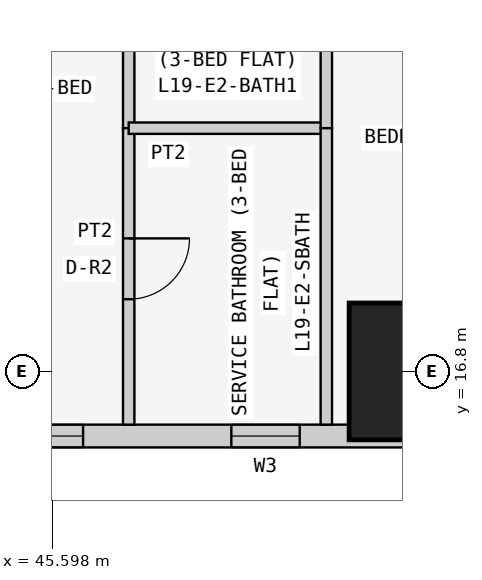
"""IFC4 building model, lengths in metres.
Left out: names, types, materials, properties, quantities, classifications, styles, units other than length and angle.
Written with IfcOpenShell. Run it as: python <this file> out.ifc"""

import sys

from ifc_helpers import new_model, si_unit, direction, frame, frame_2d, origin, origin_2d, place, context, subcontext, project, spatial, rectangle, extrude, element, fill, save


model = new_model("IFC4")
c1 = context("Model", 3, precision=1e-05, world=origin(), true_north=direction((0.0, 1.0)))
c2 = subcontext(c1, "Body", "Model", "MODEL_VIEW")
j1 = project(units=[si_unit("LENGTHUNIT", "METRE"), si_unit("PLANEANGLEUNIT", "RADIAN")], contexts=[c1])
p1 = place(None, origin())
s1 = spatial("IfcSite", under=j1, at=p1, CompositionType="ELEMENT")
p2 = place(p1, origin())
s2 = spatial("IfcBuilding", under=s1, at=p2, CompositionType="ELEMENT")
p3 = place(p2, frame((0.0, 0.0, 77.7)))
s3 = spatial("IfcBuildingStorey", under=s2, at=p3, CompositionType="ELEMENT", Elevation=77.7)
p4 = place(p3, frame((50.4, 16.8, 0.0), z_axis=(0.0, 0.0, 1.0), x_axis=(1.0, 0.0, 0.0)))
e1 = element("IfcColumn", 1, at=p4, inside=s3, PredefinedType="COLUMN", context=c2, shape_type="SweptSolid", body=[
    extrude(rectangle(XDim=1.8, YDim=1.8, at=origin_2d()), origin(), (0.0, 0.0, 1.0), 3.6),
])
p5 = place(p3, frame((43.0, 15.95, 0.0), z_axis=(0.0, 0.0, 1.0), x_axis=(1.0, 0.0, 0.0)))
e2 = element("IfcWall", 2, at=p5, inside=s3, PredefinedType="SOLIDWALL", context=c2, shape_type="SweptSolid", body=[
    extrude(rectangle(XDim=15.4, YDim=0.3, at=frame_2d((7.7, 0.0))), origin(), (0.0, 0.0, 1.0), 3.45),
])
p6 = place(p5, frame((1.2, 0.0, 0.9)))
e3 = element("IfcOpeningElement", 3, at=p6, cuts=e2, PredefinedType="OPENING", context=c2, shape_type="SweptSolid", body=[
    extrude(rectangle(XDim=1.8, YDim=1.5, at=frame_2d((0.9, 0.75))), frame((0.0, 0.16, 0.0), z_axis=(0.0, -1.0, 0.0), x_axis=(1.0, 0.0, 0.0)), (0.0, 0.0, 1.0), 0.32),
])
p7 = place(p5, frame((4.95, 0.0, 1.5)))
e4 = element("IfcOpeningElement", 4, at=p7, cuts=e2, PredefinedType="OPENING", context=c2, shape_type="SweptSolid", body=[
    extrude(rectangle(XDim=0.9, YDim=0.7, at=frame_2d((0.45, 0.35))), frame((0.0, 0.16, 0.0), z_axis=(0.0, -1.0, 0.0), x_axis=(1.0, 0.0, 0.0)), (0.0, 0.0, 1.0), 0.32),
])
p8 = place(p5, frame((8.5, 0.0, 0.9)))
e5 = element("IfcOpeningElement", 5, at=p8, cuts=e2, PredefinedType="OPENING", context=c2, shape_type="SweptSolid", body=[
    extrude(rectangle(XDim=1.8, YDim=1.5, at=frame_2d((0.9, 0.75))), frame((0.0, 0.16, 0.0), z_axis=(0.0, -1.0, 0.0), x_axis=(1.0, 0.0, 0.0)), (0.0, 0.0, 1.0), 0.32),
])
p9 = place(p5, frame((12.5, 0.0, 0.0)))
e6 = element("IfcOpeningElement", 6, at=p9, cuts=e2, PredefinedType="OPENING", context=c2, shape_type="SweptSolid", body=[
    extrude(rectangle(XDim=0.9, YDim=2.4, at=frame_2d((0.45, 1.2))), frame((0.0, 0.16, 0.0), z_axis=(0.0, -1.0, 0.0), x_axis=(1.0, 0.0, 0.0)), (0.0, 0.0, 1.0), 0.32),
])
p10 = place(p5, frame((13.5, 0.0, 0.9)))
e7 = element("IfcOpeningElement", 7, at=p10, cuts=e2, PredefinedType="OPENING", context=c2, shape_type="SweptSolid", body=[
    extrude(rectangle(XDim=1.2, YDim=1.5, at=frame_2d((0.6, 0.75))), frame((0.0, 0.16, 0.0), z_axis=(0.0, -1.0, 0.0), x_axis=(1.0, 0.0, 0.0)), (0.0, 0.0, 1.0), 0.32),
])
p11 = place(p3, frame((46.6, 22.971, 0.0), z_axis=(0.0, 0.0, 1.0), x_axis=(0.0, -1.0, 0.0)))
e8 = element("IfcWall", 8, at=p11, inside=s3, PredefinedType="PARTITIONING", context=c2, shape_type="SweptSolid", body=[
    extrude(rectangle(XDim=2.971, YDim=0.15, at=frame_2d((1.485, 0.0))), origin(), (0.0, 0.0, 1.0), 3.45),
])
p12 = place(p3, frame((46.6, 20.0, 0.0), z_axis=(0.0, 0.0, 1.0), x_axis=(0.0, -1.0, 0.0)))
e9 = element("IfcWall", 9, at=p12, inside=s3, PredefinedType="PARTITIONING", context=c2, shape_type="SweptSolid", body=[
    extrude(rectangle(XDim=3.9, YDim=0.15, at=frame_2d((1.95, 0.0))), origin(), (0.0, 0.0, 1.0), 3.45),
])
p13 = place(p12, frame((1.45, 0.0, 0.0)))
e10 = element("IfcOpeningElement", 10, at=p13, cuts=e9, PredefinedType="OPENING", context=c2, shape_type="SweptSolid", body=[
    extrude(rectangle(XDim=0.8, YDim=2.1, at=frame_2d((0.4, 1.05))), frame((0.0, 0.085, 0.0), z_axis=(0.0, -1.0, 0.0), x_axis=(1.0, 0.0, 0.0)), (0.0, 0.0, 1.0), 0.17),
])
p14 = place(p3, frame((49.2, 20.0, 0.0), z_axis=(0.0, 0.0, 1.0), x_axis=(-1.0, 0.0, 0.0)))
e11 = element("IfcWall", 11, at=p14, inside=s3, PredefinedType="PARTITIONING", context=c2, shape_type="SweptSolid", body=[
    extrude(rectangle(XDim=2.6, YDim=0.15, at=frame_2d((1.3, 0.0))), origin(), (0.0, 0.0, 1.0), 3.45),
])
p15 = place(p3, frame((49.2, 22.971, 0.0), z_axis=(0.0, 0.0, 1.0), x_axis=(0.0, -1.0, 0.0)))
e12 = element("IfcWall", 12, at=p15, inside=s3, PredefinedType="PARTITIONING", context=c2, shape_type="SweptSolid", body=[
    extrude(rectangle(XDim=2.971, YDim=0.15, at=frame_2d((1.485, 0.0))), origin(), (0.0, 0.0, 1.0), 3.45),
])
p16 = place(p3, frame((49.2, 20.0, 0.0), z_axis=(0.0, 0.0, 1.0), x_axis=(0.0, -1.0, 0.0)))
e13 = element("IfcWall", 13, at=p16, inside=s3, PredefinedType="PARTITIONING", context=c2, shape_type="SweptSolid", body=[
    extrude(rectangle(XDim=3.9, YDim=0.15, at=frame_2d((1.95, 0.0))), origin(), (0.0, 0.0, 1.0), 3.45),
])
p17 = place(p6, origin())
e14 = element("IfcWindow", 14, at=p17, inside=s3, PartitioningType="SINGLE_PANEL", PredefinedType="WINDOW", context=c2, shape_type="SweptSolid", body=[
    extrude(rectangle(XDim=1.8, YDim=1.5, at=frame_2d((0.9, 0.75))), frame((0.0, 0.03, 0.0), z_axis=(0.0, -1.0, 0.0), x_axis=(1.0, 0.0, 0.0)), (0.0, 0.0, 1.0), 0.06),
])
fill(e3, e14)
p18 = place(p7, origin())
e15 = element("IfcWindow", 15, at=p18, inside=s3, PartitioningType="SINGLE_PANEL", PredefinedType="WINDOW", context=c2, shape_type="SweptSolid", body=[
    extrude(rectangle(XDim=0.9, YDim=0.7, at=frame_2d((0.45, 0.35))), frame((0.0, 0.03, 0.0), z_axis=(0.0, -1.0, 0.0), x_axis=(1.0, 0.0, 0.0)), (0.0, 0.0, 1.0), 0.06),
])
fill(e4, e15)
p19 = place(p13, origin())
e16 = element("IfcDoor", 16, at=p19, inside=s3, OperationType="SINGLE_SWING_LEFT", PredefinedType="DOOR", context=c2, shape_type="SweptSolid", body=[
    extrude(rectangle(XDim=0.8, YDim=2.1, at=frame_2d((0.4, 1.05))), frame((0.0, 0.025, 0.0), z_axis=(0.0, -1.0, 0.0), x_axis=(1.0, 0.0, 0.0)), (0.0, 0.0, 1.0), 0.05),
])
fill(e10, e16)
save(model, sys.argv[1])
